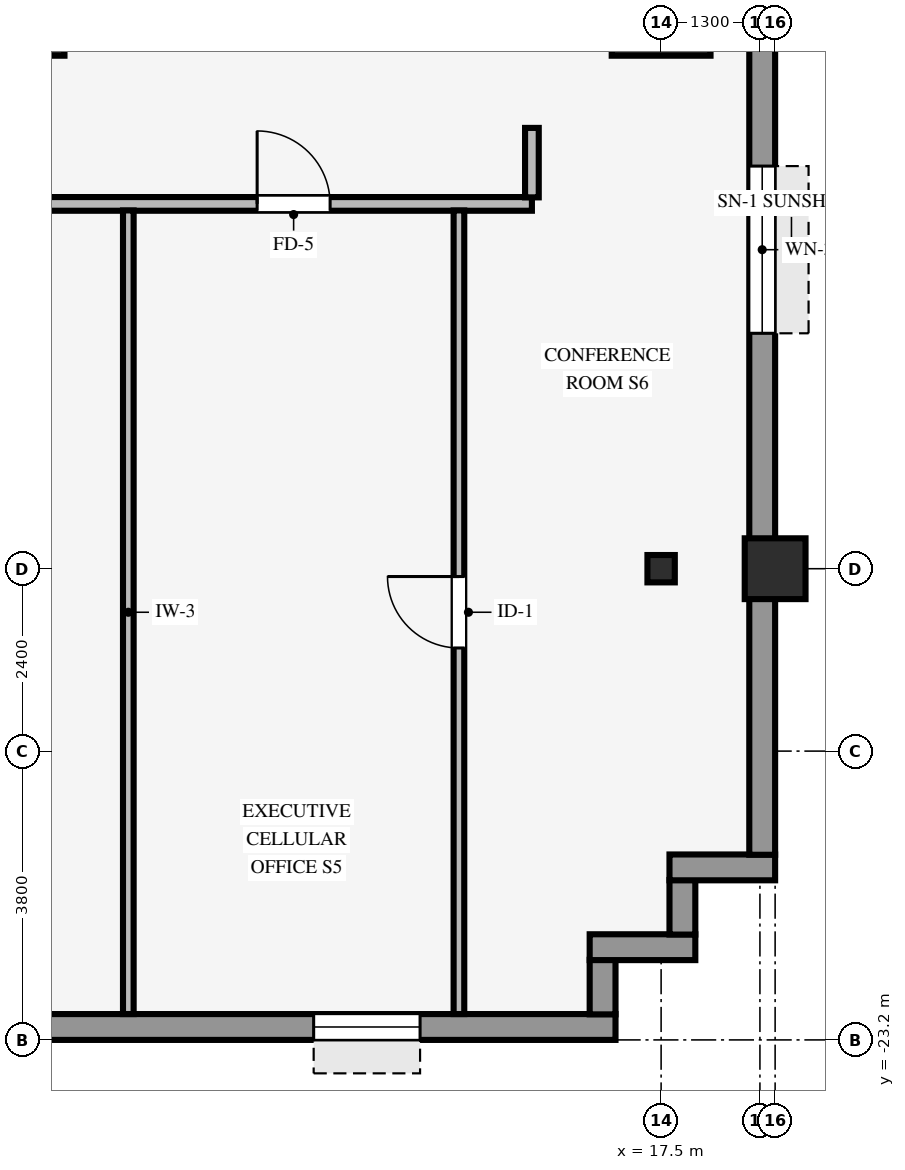
"""IFC4 building model, lengths in metres.
Left out: names, types, materials, properties, quantities, classifications, styles, units other than length and angle.
Written with IfcOpenShell. Run it as: python <this file> out.ifc"""

import sys

from ifc_helpers import new_model, si_unit, direction, frame, frame_2d, origin, origin_2d, place, context, subcontext, project, spatial, rectangle, hollow_rectangle, i_section, extrude, source, transform, mapped, element, fill, save


model = new_model("IFC4")
c1 = context("Model", 3, precision=1e-05, world=origin(), true_north=direction((0.0, 1.0)))
c2 = subcontext(c1, "Body", "Model", "MODEL_VIEW")
j1 = project(units=[si_unit("LENGTHUNIT", "METRE"), si_unit("PLANEANGLEUNIT", "RADIAN")], contexts=[c1])
p1 = place(None, origin())
s1 = spatial("IfcSite", under=j1, at=p1, CompositionType="ELEMENT")
p2 = place(p1, origin())
s2 = spatial("IfcBuilding", under=s1, at=p2, CompositionType="ELEMENT")
p3 = place(p2, frame((0.0, 0.0, 49.5)))
s3 = spatial("IfcBuildingStorey", under=s2, at=p3, CompositionType="ELEMENT", Elevation=49.5)
for number, where, z_axis, x_axis in (
    (1, (9.0, -9.6, 0.0), (0.0, 0.0, 1.0), (1.0, 0.0, 0.0)),
    (2, (17.5, -9.6, 0.0), (0.0, 0.0, 1.0), (1.0, 0.0, 0.0)),
):
    element("IfcColumn", number, at=place(p3, frame(where, z_axis=z_axis, x_axis=x_axis)), inside=s3, PredefinedType="COLUMN", context=c2, shape_type="SweptSolid", body=[
        extrude(rectangle(XDim=1.3, YDim=1.3, at=origin_2d()), origin(), (0.0, 0.0, 1.0), 3.37),
    ])
p4 = place(p3, frame((19.0, -17.0, 0.0), z_axis=(0.0, 0.0, 1.0), x_axis=(1.0, 0.0, 0.0)))
e3 = element("IfcColumn", 3, at=p4, inside=s3, PredefinedType="COLUMN", context=c2, shape_type="SweptSolid", body=[
    extrude(hollow_rectangle(XDim=0.8, YDim=0.8, WallThickness=0.055, InnerFilletRadius=0.055, OuterFilletRadius=0.11, at=origin_2d()), origin(), (0.0, 0.0, 1.0), 3.37),
])
p5 = place(p3, frame((17.5, -17.0, 0.0), z_axis=(0.0, 0.0, 1.0), x_axis=(1.0, 0.0, 0.0)))
e4 = element("IfcColumn", 4, at=p5, inside=s3, PredefinedType="COLUMN", context=c2, shape_type="SweptSolid", body=[
    extrude(i_section(OverallWidth=0.36, OverallDepth=0.36, WebThickness=0.021, FlangeThickness=0.021, FilletRadius=0.018, at=origin_2d()), origin(), (0.0, 0.0, 1.0), 3.37),
])
p6 = place(p3, frame((-16.9, -23.03, 0.0), z_axis=(0.0, 0.0, 1.0), x_axis=(1.0, 0.0, 0.0)))
e5 = element("IfcWall", 5, at=p6, inside=s3, PredefinedType="STANDARD", context=c2, shape_type="SweptSolid", body=[
    extrude(rectangle(XDim=33.8, YDim=0.34, at=frame_2d((16.9, 0.0))), origin(), (0.0, 0.0, 1.0), 2.705),
])
p7 = place(p6, frame((2.121, 0.0, 0.8)))
e6 = element("IfcOpeningElement", 6, at=p7, cuts=e5, PredefinedType="OPENING", context=c2, shape_type="SweptSolid", body=[
    extrude(rectangle(XDim=1.4, YDim=1.65, at=frame_2d((0.7, 0.825))), frame((0.0, 0.18, 0.0), z_axis=(0.0, -1.0, 0.0), x_axis=(1.0, 0.0, 0.0)), (0.0, 0.0, 1.0), 0.36),
])
p8 = place(p6, frame((5.764, 0.0, 0.8)))
e7 = element("IfcOpeningElement", 7, at=p8, cuts=e5, PredefinedType="OPENING", context=c2, shape_type="SweptSolid", body=[
    extrude(rectangle(XDim=1.4, YDim=1.65, at=frame_2d((0.7, 0.825))), frame((0.0, 0.18, 0.0), z_axis=(0.0, -1.0, 0.0), x_axis=(1.0, 0.0, 0.0)), (0.0, 0.0, 1.0), 0.36),
])
p9 = place(p6, frame((11.657, 0.0, 0.8)))
e8 = element("IfcOpeningElement", 8, at=p9, cuts=e5, PredefinedType="OPENING", context=c2, shape_type="SweptSolid", body=[
    extrude(rectangle(XDim=1.4, YDim=1.65, at=frame_2d((0.7, 0.825))), frame((0.0, 0.18, 0.0), z_axis=(0.0, -1.0, 0.0), x_axis=(1.0, 0.0, 0.0)), (0.0, 0.0, 1.0), 0.36),
])
p10 = place(p6, frame((20.743, 0.0, 0.8)))
e9 = element("IfcOpeningElement", 9, at=p10, cuts=e5, PredefinedType="OPENING", context=c2, shape_type="SweptSolid", body=[
    extrude(rectangle(XDim=1.4, YDim=1.65, at=frame_2d((0.7, 0.825))), frame((0.0, 0.18, 0.0), z_axis=(0.0, -1.0, 0.0), x_axis=(1.0, 0.0, 0.0)), (0.0, 0.0, 1.0), 0.36),
])
p11 = place(p6, frame((29.829, 0.0, 0.8)))
e10 = element("IfcOpeningElement", 10, at=p11, cuts=e5, PredefinedType="OPENING", context=c2, shape_type="SweptSolid", body=[
    extrude(rectangle(XDim=1.4, YDim=1.65, at=frame_2d((0.7, 0.825))), frame((0.0, 0.18, 0.0), z_axis=(0.0, -1.0, 0.0), x_axis=(1.0, 0.0, 0.0)), (0.0, 0.0, 1.0), 0.36),
])
p12 = place(p3, frame((16.73, -22.864, 0.0), z_axis=(0.0, 0.0, 1.0), x_axis=(0.0, 1.0, 0.0)))
e11 = element("IfcWall", 11, at=p12, inside=s3, PredefinedType="STANDARD", context=c2, shape_type="SweptSolid", body=[
    extrude(rectangle(XDim=0.718, YDim=0.34, at=frame_2d((0.359, 0.0))), origin(), (0.0, 0.0, 1.0), 3.36),
])
p13 = place(p3, frame((16.56, -21.98, 0.0), z_axis=(0.0, 0.0, 1.0), x_axis=(1.0, 0.0, 0.0)))
e12 = element("IfcWall", 12, at=p13, inside=s3, PredefinedType="STANDARD", context=c2, shape_type="SweptSolid", body=[
    extrude(rectangle(XDim=1.39, YDim=0.34, at=frame_2d((0.695, 0.0))), origin(), (0.0, 0.0, 1.0), 3.36),
])
p14 = place(p3, frame((17.78, -21.814, 0.0), z_axis=(0.0, 0.0, 1.0), x_axis=(0.0, 1.0, 0.0)))
e13 = element("IfcWall", 13, at=p14, inside=s3, PredefinedType="STANDARD", context=c2, shape_type="SweptSolid", body=[
    extrude(rectangle(XDim=0.718, YDim=0.34, at=frame_2d((0.359, 0.0))), origin(), (0.0, 0.0, 1.0), 3.36),
])
p15 = place(p3, frame((17.61, -20.93, 0.0), z_axis=(0.0, 0.0, 1.0), x_axis=(1.0, 0.0, 0.0)))
e14 = element("IfcWall", 14, at=p15, inside=s3, PredefinedType="STANDARD", context=c2, shape_type="SweptSolid", body=[
    extrude(rectangle(XDim=1.39, YDim=0.34, at=frame_2d((0.695, 0.0))), origin(), (0.0, 0.0, 1.0), 3.36),
])
p16 = place(p3, frame((18.83, -20.764, 0.0), z_axis=(0.0, 0.0, 1.0), x_axis=(0.0, 1.0, 0.0)))
e15 = element("IfcWall", 15, at=p16, inside=s3, PredefinedType="STANDARD", context=c2, shape_type="SweptSolid", body=[
    extrude(rectangle(XDim=41.528, YDim=0.34, at=frame_2d((20.764, 0.0))), origin(), (0.0, 0.0, 1.0), 2.705),
])
p17 = place(p16, frame((6.862, 0.0, 0.8)))
e16 = element("IfcOpeningElement", 16, at=p17, cuts=e15, PredefinedType="OPENING", context=c2, shape_type="SweptSolid", body=[
    extrude(rectangle(XDim=2.2, YDim=1.65, at=frame_2d((1.1, 0.825))), frame((0.0, 0.18, 0.0), z_axis=(0.0, -1.0, 0.0), x_axis=(1.0, 0.0, 0.0)), (0.0, 0.0, 1.0), 0.36),
])
p18 = place(p16, frame((32.467, 0.0, 0.8)))
e17 = element("IfcOpeningElement", 17, at=p18, cuts=e15, PredefinedType="OPENING", context=c2, shape_type="SweptSolid", body=[
    extrude(rectangle(XDim=2.2, YDim=1.65, at=frame_2d((1.1, 0.825))), frame((0.0, 0.18, 0.0), z_axis=(0.0, -1.0, 0.0), x_axis=(1.0, 0.0, 0.0)), (0.0, 0.0, 1.0), 0.36),
])
p19 = place(p3, frame((-15.8, -12.2, 0.0), z_axis=(0.0, 0.0, 1.0), x_axis=(1.0, 0.0, 0.0)))
e18 = element("IfcWall", 18, at=p19, inside=s3, PredefinedType="PARTITIONING", context=c2, shape_type="SweptSolid", body=[
    extrude(rectangle(XDim=31.6, YDim=0.18, at=frame_2d((15.8, 0.0))), origin(), (0.0, 0.0, 1.0), 3.36),
])
p20 = place(p19, frame((18.085, 0.0, 0.0)))
e19 = element("IfcOpeningElement", 19, at=p20, cuts=e18, PredefinedType="OPENING", context=c2, shape_type="SweptSolid", body=[
    extrude(rectangle(XDim=0.96, YDim=2.1, at=frame_2d((0.48, 1.05))), frame((0.0, 0.1, 0.0), z_axis=(0.0, -1.0, 0.0), x_axis=(1.0, 0.0, 0.0)), (0.0, 0.0, 1.0), 0.2),
])
p21 = place(p19, frame((27.985, 0.0, 0.0)))
e20 = element("IfcOpeningElement", 20, at=p21, cuts=e18, PredefinedType="OPENING", context=c2, shape_type="SweptSolid", body=[
    extrude(rectangle(XDim=0.96, YDim=2.1, at=frame_2d((0.48, 1.05))), frame((0.0, 0.1, 0.0), z_axis=(0.0, -1.0, 0.0), x_axis=(1.0, 0.0, 0.0)), (0.0, 0.0, 1.0), 0.2),
])
p22 = place(p19, frame((23.73, 0.0, 0.0)))
e21 = element("IfcOpeningElement", 21, at=p22, cuts=e18, PredefinedType="OPENING", context=c2, shape_type="SweptSolid", body=[
    extrude(rectangle(XDim=0.96, YDim=2.1, at=frame_2d((0.48, 1.05))), frame((0.0, 0.1, 0.0), z_axis=(0.0, -1.0, 0.0), x_axis=(1.0, 0.0, 0.0)), (0.0, 0.0, 1.0), 0.2),
])
p23 = place(p19, frame((0.92, 0.0, 0.0)))
e22 = element("IfcOpeningElement", 22, at=p23, cuts=e18, PredefinedType="OPENING", context=c2, shape_type="SweptSolid", body=[
    extrude(rectangle(XDim=0.96, YDim=2.1, at=frame_2d((0.48, 1.05))), frame((0.0, 0.1, 0.0), z_axis=(0.0, -1.0, 0.0), x_axis=(1.0, 0.0, 0.0)), (0.0, 0.0, 1.0), 0.2),
])
p24 = place(p19, frame((6.25, 0.0, 0.0)))
e23 = element("IfcOpeningElement", 23, at=p24, cuts=e18, PredefinedType="OPENING", context=c2, shape_type="SweptSolid", body=[
    extrude(rectangle(XDim=0.9, YDim=2.1, at=frame_2d((0.45, 1.05))), frame((0.0, 0.1, 0.0), z_axis=(0.0, -1.0, 0.0), x_axis=(1.0, 0.0, 0.0)), (0.0, 0.0, 1.0), 0.2),
])
p25 = place(p19, frame((3.65, 0.0, 0.0)))
e24 = element("IfcOpeningElement", 24, at=p25, cuts=e18, PredefinedType="OPENING", context=c2, shape_type="SweptSolid", body=[
    extrude(rectangle(XDim=0.9, YDim=2.1, at=frame_2d((0.45, 1.05))), frame((0.0, 0.1, 0.0), z_axis=(0.0, -1.0, 0.0), x_axis=(1.0, 0.0, 0.0)), (0.0, 0.0, 1.0), 0.2),
])
p26 = place(p19, frame((13.32, 0.0, 0.0)))
e25 = element("IfcOpeningElement", 25, at=p26, cuts=e18, PredefinedType="OPENING", context=c2, shape_type="SweptSolid", body=[
    extrude(rectangle(XDim=0.96, YDim=2.1, at=frame_2d((0.48, 1.05))), frame((0.0, 0.1, 0.0), z_axis=(0.0, -1.0, 0.0), x_axis=(1.0, 0.0, 0.0)), (0.0, 0.0, 1.0), 0.2),
])
p27 = place(p19, frame((8.75, 0.0, 0.0)))
e26 = element("IfcOpeningElement", 26, at=p27, cuts=e18, PredefinedType="OPENING", context=c2, shape_type="SweptSolid", body=[
    extrude(rectangle(XDim=0.9, YDim=2.1, at=frame_2d((0.45, 1.05))), frame((0.0, 0.1, 0.0), z_axis=(0.0, -1.0, 0.0), x_axis=(1.0, 0.0, 0.0)), (0.0, 0.0, 1.0), 0.2),
])
p28 = place(p3, frame((10.49, -22.86, 0.0), z_axis=(0.0, 0.0, 1.0), x_axis=(0.0, 1.0, 0.0)))
e27 = element("IfcWall", 27, at=p28, inside=s3, PredefinedType="PARTITIONING", context=c2, shape_type="SweptSolid", body=[
    extrude(rectangle(XDim=10.574, YDim=0.14, at=frame_2d((5.287, 0.0))), origin(), (0.0, 0.0, 1.0), 3.36),
])
p29 = place(p3, frame((14.84, -22.86, 0.0), z_axis=(0.0, 0.0, 1.0), x_axis=(0.0, 1.0, 0.0)))
e28 = element("IfcWall", 28, at=p29, inside=s3, PredefinedType="PARTITIONING", context=c2, shape_type="SweptSolid", body=[
    extrude(rectangle(XDim=10.574, YDim=0.14, at=frame_2d((5.287, 0.0))), origin(), (0.0, 0.0, 1.0), 3.36),
])
p30 = place(p29, frame((4.817, 0.0, 0.0)))
e29 = element("IfcOpeningElement", 29, at=p30, cuts=e28, PredefinedType="OPENING", context=c2, shape_type="SweptSolid", body=[
    extrude(rectangle(XDim=0.94, YDim=2.1, at=frame_2d((0.47, 1.05))), frame((0.0, 0.08, 0.0), z_axis=(0.0, -1.0, 0.0), x_axis=(1.0, 0.0, 0.0)), (0.0, 0.0, 1.0), 0.16),
])
p31 = place(p3, frame((15.8, -12.114, 0.0), z_axis=(0.0, 0.0, 1.0), x_axis=(0.0, 1.0, 0.0)))
e30 = element("IfcWall", 30, at=p31, inside=s3, PredefinedType="PARTITIONING", context=c2, shape_type="SweptSolid", body=[
    extrude(rectangle(XDim=0.914, YDim=0.18, at=frame_2d((0.457, 0.0))), origin(), (0.0, 0.0, 1.0), 3.36),
])
m1 = source(origin(), c2, "Body", "SweptSolid", [
    extrude(rectangle(XDim=1.4, YDim=1.65, at=frame_2d((0.7, 0.825))), frame((0.0, 0.03, 0.0), z_axis=(0.0, -1.0, 0.0), x_axis=(1.0, 0.0, 0.0)), (0.0, 0.0, 1.0), 0.06),
])
p32 = place(p11, origin())
e31 = element("IfcWindow", 31, at=p32, inside=s3, PartitioningType="SINGLE_PANEL", PredefinedType="WINDOW", context=c2, shape_type="MappedRepresentation", body=[
    mapped(m1, transform((0.0, 0.0, 0.0), scale=1.0)),
])
fill(e10, e31)
m2 = source(origin(), c2, "Body", "SweptSolid", [
    extrude(rectangle(XDim=2.2, YDim=1.65, at=frame_2d((1.1, 0.825))), frame((0.0, 0.03, 0.0), z_axis=(0.0, -1.0, 0.0), x_axis=(1.0, 0.0, 0.0)), (0.0, 0.0, 1.0), 0.06),
])
p33 = place(p17, origin())
e32 = element("IfcWindow", 32, at=p33, inside=s3, PartitioningType="SINGLE_PANEL", PredefinedType="WINDOW", context=c2, shape_type="MappedRepresentation", body=[
    mapped(m2, transform((0.0, 0.0, 0.0), scale=1.0)),
])
fill(e16, e32)
m3 = source(origin(), c2, "Body", "SweptSolid", [
    extrude(rectangle(XDim=0.96, YDim=2.1, at=frame_2d((0.48, 1.05))), frame((0.0, 0.025, 0.0), z_axis=(0.0, -1.0, 0.0), x_axis=(1.0, 0.0, 0.0)), (0.0, 0.0, 1.0), 0.05),
])
p34 = place(p21, origin())
e33 = element("IfcDoor", 33, at=p34, inside=s3, OperationType="SINGLE_SWING_LEFT", PredefinedType="DOOR", context=c2, shape_type="MappedRepresentation", body=[
    mapped(m3, transform((0.0, 0.0, 0.0), scale=1.0)),
])
fill(e20, e33)
m4 = source(origin(), c2, "Body", "SweptSolid", [
    extrude(rectangle(XDim=0.94, YDim=2.1, at=frame_2d((0.47, 1.05))), frame((0.0, 0.025, 0.0), z_axis=(0.0, -1.0, 0.0), x_axis=(1.0, 0.0, 0.0)), (0.0, 0.0, 1.0), 0.05),
])
p35 = place(p30, origin())
e34 = element("IfcDoor", 34, at=p35, inside=s3, OperationType="SINGLE_SWING_RIGHT", PredefinedType="DOOR", context=c2, shape_type="MappedRepresentation", body=[
    mapped(m4, transform((0.0, 0.0, 0.0), scale=1.0)),
])
fill(e29, e34)
save(model, sys.argv[1])
